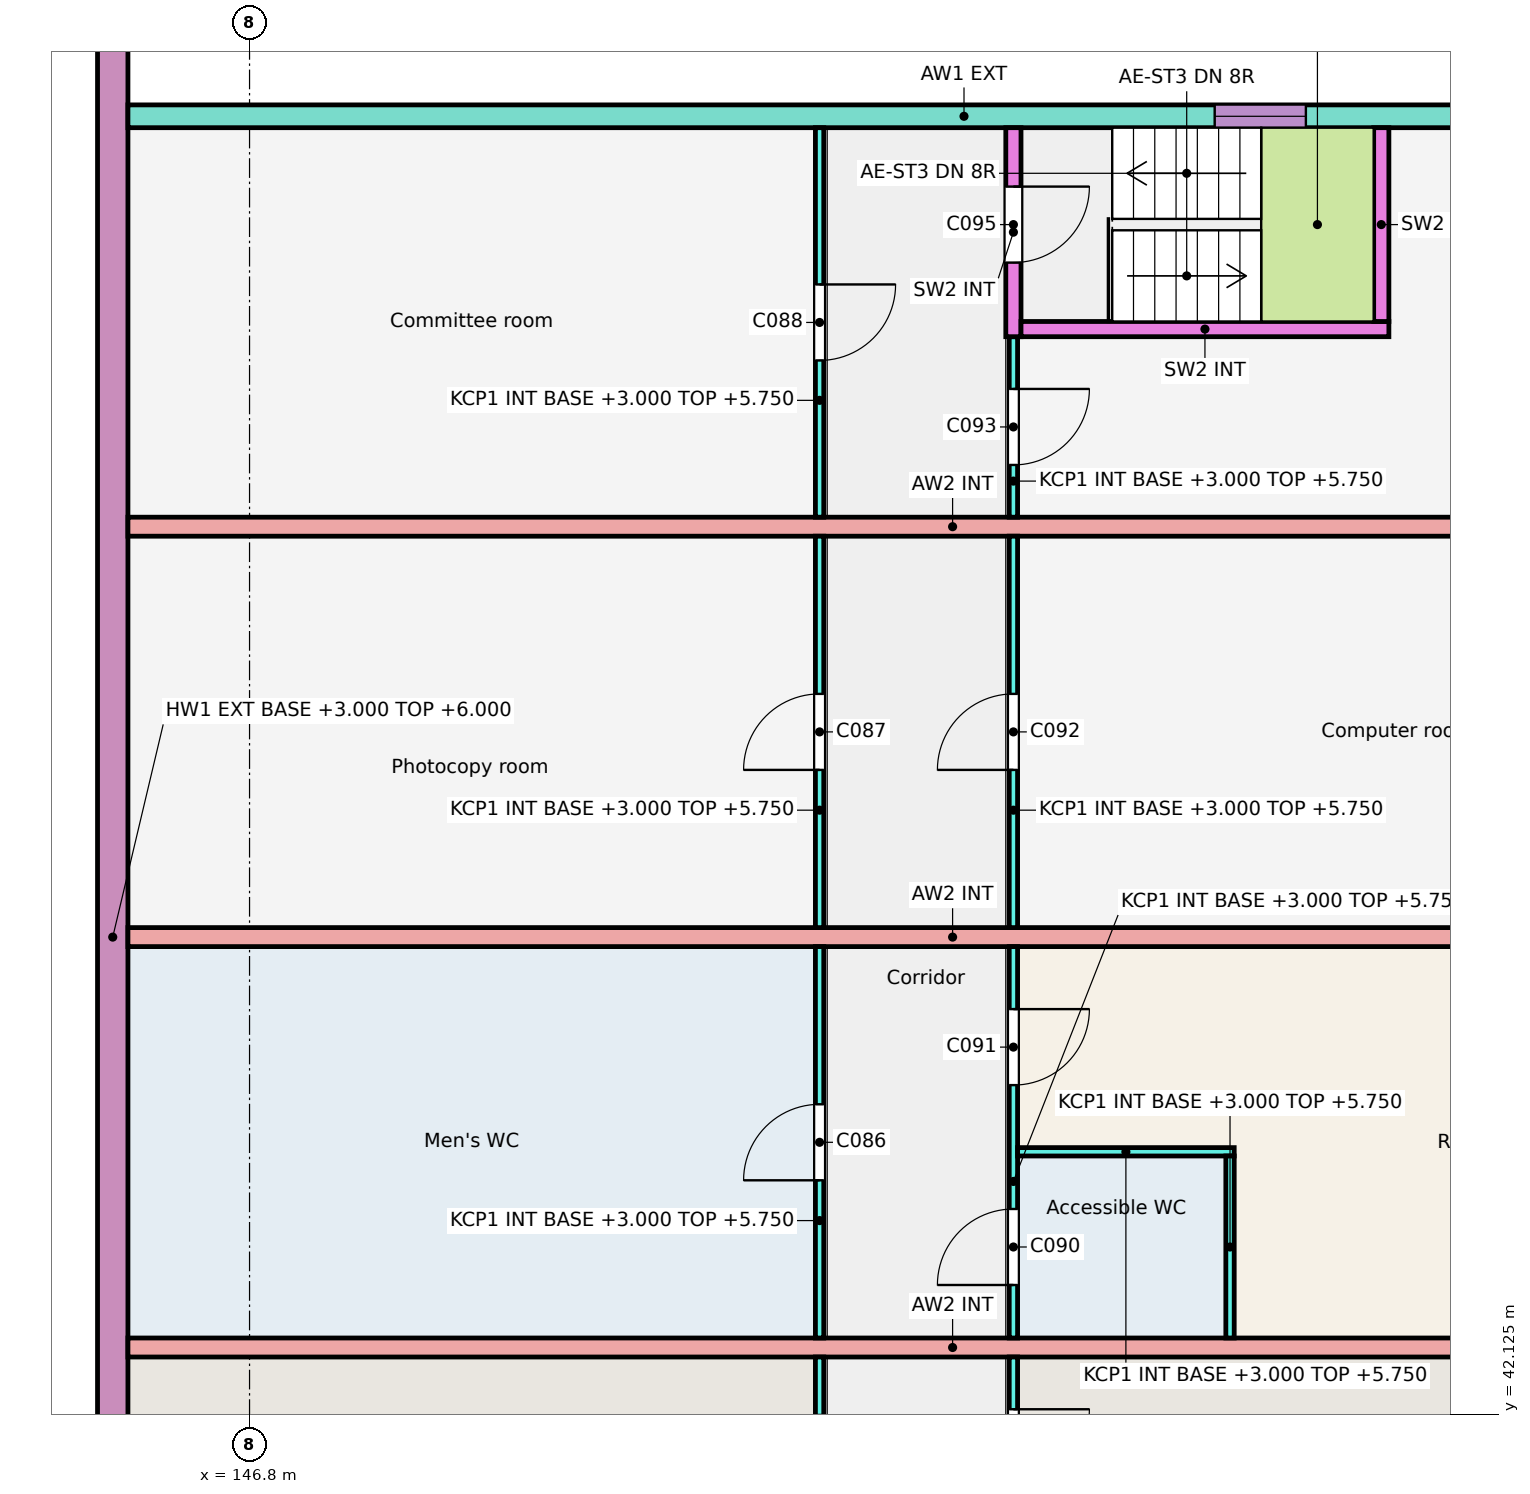
"""IFC4 building model, lengths in metres.
Left out: names, types, materials, properties, quantities, classifications, styles, units other than length and angle.
Written with IfcOpenShell. Run it as: python <this file> out.ifc"""

import sys

from ifc_helpers import new_model, si_unit, direction, frame, frame_2d, origin, place, context, subcontext, project, spatial, rectangle, extrude, element, fill, save


model = new_model("IFC4")
c1 = context("Model", 3, precision=1e-05, world=origin(), true_north=direction((0.0, 1.0)))
c2 = subcontext(c1, "Body", "Model", "MODEL_VIEW")
j1 = project(units=[si_unit("LENGTHUNIT", "METRE"), si_unit("PLANEANGLEUNIT", "RADIAN")], contexts=[c1])
p1 = place(None, origin())
s1 = spatial("IfcSite", under=j1, at=p1, CompositionType="ELEMENT")
p2 = place(p1, origin())
s2 = spatial("IfcBuilding", under=s1, at=p2, CompositionType="ELEMENT")
p3 = place(p2, frame((0.0, 0.0, 3.0)))
s3 = spatial("IfcBuildingStorey", under=s2, at=p3, CompositionType="ELEMENT", Elevation=3.0)
p4 = place(p3, frame((145.0, 32.0, 0.0), z_axis=(0.0, 0.0, 1.0), x_axis=(0.0, 1.0, 0.0)))
e1 = element("IfcWall", 1, at=p4, inside=s3, PredefinedType="SOLIDWALL", context=c2, shape_type="SweptSolid", body=[
    extrude(rectangle(XDim=32.8, YDim=0.4, at=frame_2d((16.4, 0.0))), origin(), (0.0, 0.0, 1.0), 3.0),
])
p5 = place(p4, frame((2.5, 0.0, 0.9)))
e2 = element("IfcOpeningElement", 2, at=p5, cuts=e1, PredefinedType="OPENING", context=c2, shape_type="SweptSolid", body=[
    extrude(rectangle(XDim=1.2, YDim=1.6, at=frame_2d((0.6, 0.8))), frame((0.0, 0.21, 0.0), z_axis=(0.0, -1.0, 0.0), x_axis=(1.0, 0.0, 0.0)), (0.0, 0.0, 1.0), 0.42),
])
p6 = place(p4, frame((29.3, 0.0, 0.9)))
e3 = element("IfcOpeningElement", 3, at=p6, cuts=e1, PredefinedType="OPENING", context=c2, shape_type="SweptSolid", body=[
    extrude(rectangle(XDim=1.2, YDim=1.6, at=frame_2d((0.6, 0.8))), frame((0.0, 0.21, 0.0), z_axis=(0.0, -1.0, 0.0), x_axis=(1.0, 0.0, 0.0)), (0.0, 0.0, 1.0), 0.42),
])
p7 = place(p3, frame((145.2, 59.2, 0.0), z_axis=(0.0, 0.0, 1.0), x_axis=(1.0, 0.0, 0.0)))
e4 = element("IfcWall", 4, at=p7, inside=s3, PredefinedType="SOLIDWALL", context=c2, shape_type="SweptSolid", body=[
    extrude(rectangle(XDim=22.0, YDim=0.3, at=frame_2d((11.0, 0.0))), origin(), (0.0, 0.0, 1.0), 3.0),
])
p8 = place(p7, frame((14.298, 0.0, 0.9)))
e5 = element("IfcOpeningElement", 5, at=p8, cuts=e4, PredefinedType="OPENING", context=c2, shape_type="SweptSolid", body=[
    extrude(rectangle(XDim=1.2, YDim=1.5, at=frame_2d((0.6, 0.75))), frame((0.0, 0.16, 0.0), z_axis=(0.0, -1.0, 0.0), x_axis=(1.0, 0.0, 0.0)), (0.0, 0.0, 1.0), 0.32),
])
for number, where, z_axis, x_axis in (
    (6, (145.2, 43.0, 0.0), (0.0, 0.0, 1.0), (1.0, 0.0, 0.0)),
    (7, (145.2, 48.4, 0.0), (0.0, 0.0, 1.0), (1.0, 0.0, 0.0)),
    (8, (145.2, 53.8, 0.0), (0.0, 0.0, 1.0), (1.0, 0.0, 0.0)),
):
    element("IfcWall", number, at=place(p3, frame(where, z_axis=z_axis, x_axis=x_axis)), inside=s3, PredefinedType="SOLIDWALL", context=c2, shape_type="SweptSolid", body=[
        extrude(rectangle(XDim=21.7, YDim=0.25, at=frame_2d((10.85, 0.0))), origin(), (0.0, 0.0, 1.0), 3.0),
    ])
p9 = place(p3, frame((154.3, 40.35, 0.0), z_axis=(0.0, 0.0, 1.0), x_axis=(0.0, 1.0, 0.0)))
e9 = element("IfcWall", 9, at=p9, inside=s3, PredefinedType="PARTITIONING", context=c2, shape_type="SweptSolid", body=[
    extrude(rectangle(XDim=2.525, YDim=0.11, at=frame_2d((1.262, 0.0))), origin(), (0.0, 0.0, 1.0), 2.75),
])
p10 = place(p9, frame((0.762, 0.0, 0.0)))
e10 = element("IfcOpeningElement", 10, at=p10, cuts=e9, PredefinedType="OPENING", context=c2, shape_type="SweptSolid", body=[
    extrude(rectangle(XDim=1.0, YDim=2.1, at=frame_2d((0.5, 1.05))), frame((0.0, 0.065, 0.0), z_axis=(0.0, -1.0, 0.0), x_axis=(1.0, 0.0, 0.0)), (0.0, 0.0, 1.0), 0.13),
])
p11 = place(p3, frame((154.3, 43.125, 0.0), z_axis=(0.0, 0.0, 1.0), x_axis=(0.0, 1.0, 0.0)))
e11 = element("IfcWall", 11, at=p11, inside=s3, PredefinedType="PARTITIONING", context=c2, shape_type="SweptSolid", body=[
    extrude(rectangle(XDim=5.15, YDim=0.11, at=frame_2d((2.575, 0.0))), origin(), (0.0, 0.0, 1.0), 2.75),
])
p12 = place(p11, frame((2.075, 0.0, 0.0)))
e12 = element("IfcOpeningElement", 12, at=p12, cuts=e11, PredefinedType="OPENING", context=c2, shape_type="SweptSolid", body=[
    extrude(rectangle(XDim=1.0, YDim=2.1, at=frame_2d((0.5, 1.05))), frame((0.0, 0.065, 0.0), z_axis=(0.0, -1.0, 0.0), x_axis=(1.0, 0.0, 0.0)), (0.0, 0.0, 1.0), 0.13),
])
p13 = place(p3, frame((154.3, 48.525, 0.0), z_axis=(0.0, 0.0, 1.0), x_axis=(0.0, 1.0, 0.0)))
e13 = element("IfcWall", 13, at=p13, inside=s3, PredefinedType="PARTITIONING", context=c2, shape_type="SweptSolid", body=[
    extrude(rectangle(XDim=5.15, YDim=0.11, at=frame_2d((2.575, 0.0))), origin(), (0.0, 0.0, 1.0), 2.75),
])
p14 = place(p13, frame((2.075, 0.0, 0.0)))
e14 = element("IfcOpeningElement", 14, at=p14, cuts=e13, PredefinedType="OPENING", context=c2, shape_type="SweptSolid", body=[
    extrude(rectangle(XDim=1.0, YDim=2.1, at=frame_2d((0.5, 1.05))), frame((0.0, 0.065, 0.0), z_axis=(0.0, -1.0, 0.0), x_axis=(1.0, 0.0, 0.0)), (0.0, 0.0, 1.0), 0.13),
])
p15 = place(p3, frame((154.3, 53.925, 0.0), z_axis=(0.0, 0.0, 1.0), x_axis=(0.0, 1.0, 0.0)))
e15 = element("IfcWall", 15, at=p15, inside=s3, PredefinedType="PARTITIONING", context=c2, shape_type="SweptSolid", body=[
    extrude(rectangle(XDim=5.125, YDim=0.11, at=frame_2d((2.562, 0.0))), origin(), (0.0, 0.0, 1.0), 2.75),
])
p16 = place(p15, frame((2.062, 0.0, 0.0)))
e16 = element("IfcOpeningElement", 16, at=p16, cuts=e15, PredefinedType="OPENING", context=c2, shape_type="SweptSolid", body=[
    extrude(rectangle(XDim=1.0, YDim=2.1, at=frame_2d((0.5, 1.05))), frame((0.0, 0.065, 0.0), z_axis=(0.0, -1.0, 0.0), x_axis=(1.0, 0.0, 0.0)), (0.0, 0.0, 1.0), 0.13),
])
p17 = place(p3, frame((156.85, 40.5, 0.0), z_axis=(0.0, 0.0, 1.0), x_axis=(0.0, 1.0, 0.0)))
e17 = element("IfcWall", 17, at=p17, inside=s3, PredefinedType="PARTITIONING", context=c2, shape_type="SweptSolid", body=[
    extrude(rectangle(XDim=2.375, YDim=0.11, at=frame_2d((1.188, 0.0))), origin(), (0.0, 0.0, 1.0), 2.75),
])
p18 = place(p17, frame((0.688, 0.0, 0.0)))
e18 = element("IfcOpeningElement", 18, at=p18, cuts=e17, PredefinedType="OPENING", context=c2, shape_type="SweptSolid", body=[
    extrude(rectangle(XDim=1.0, YDim=2.1, at=frame_2d((0.5, 1.05))), frame((0.0, 0.065, 0.0), z_axis=(0.0, -1.0, 0.0), x_axis=(1.0, 0.0, 0.0)), (0.0, 0.0, 1.0), 0.13),
])
p19 = place(p3, frame((156.85, 43.125, 0.0), z_axis=(0.0, 0.0, 1.0), x_axis=(0.0, 1.0, 0.0)))
e19 = element("IfcWall", 19, at=p19, inside=s3, PredefinedType="PARTITIONING", context=c2, shape_type="SweptSolid", body=[
    extrude(rectangle(XDim=5.15, YDim=0.11, at=frame_2d((2.575, 0.0))), origin(), (0.0, 0.0, 1.0), 2.75),
])
p20 = place(p19, frame((0.698, 0.0, 0.0)))
e20 = element("IfcOpeningElement", 20, at=p20, cuts=e19, PredefinedType="OPENING", context=c2, shape_type="SweptSolid", body=[
    extrude(rectangle(XDim=1.0, YDim=2.1, at=frame_2d((0.5, 1.05))), frame((0.0, 0.065, 0.0), z_axis=(0.0, -1.0, 0.0), x_axis=(1.0, 0.0, 0.0)), (0.0, 0.0, 1.0), 0.13),
])
p21 = place(p19, frame((3.327, 0.0, 0.0)))
e21 = element("IfcOpeningElement", 21, at=p21, cuts=e19, PredefinedType="OPENING", context=c2, shape_type="SweptSolid", body=[
    extrude(rectangle(XDim=1.0, YDim=2.1, at=frame_2d((0.5, 1.05))), frame((0.0, 0.065, 0.0), z_axis=(0.0, -1.0, 0.0), x_axis=(1.0, 0.0, 0.0)), (0.0, 0.0, 1.0), 0.13),
])
p22 = place(p3, frame((156.85, 48.525, 0.0), z_axis=(0.0, 0.0, 1.0), x_axis=(0.0, 1.0, 0.0)))
e22 = element("IfcWall", 22, at=p22, inside=s3, PredefinedType="PARTITIONING", context=c2, shape_type="SweptSolid", body=[
    extrude(rectangle(XDim=5.15, YDim=0.11, at=frame_2d((2.575, 0.0))), origin(), (0.0, 0.0, 1.0), 2.75),
])
p23 = place(p22, frame((2.075, 0.0, 0.0)))
e23 = element("IfcOpeningElement", 23, at=p23, cuts=e22, PredefinedType="OPENING", context=c2, shape_type="SweptSolid", body=[
    extrude(rectangle(XDim=1.0, YDim=2.1, at=frame_2d((0.5, 1.05))), frame((0.0, 0.065, 0.0), z_axis=(0.0, -1.0, 0.0), x_axis=(1.0, 0.0, 0.0)), (0.0, 0.0, 1.0), 0.13),
])
p24 = place(p3, frame((156.85, 53.925, 0.0), z_axis=(0.0, 0.0, 1.0), x_axis=(0.0, 1.0, 0.0)))
e24 = element("IfcWall", 24, at=p24, inside=s3, PredefinedType="PARTITIONING", context=c2, shape_type="SweptSolid", body=[
    extrude(rectangle(XDim=2.375, YDim=0.11, at=frame_2d((1.188, 0.0))), origin(), (0.0, 0.0, 1.0), 2.75),
])
p25 = place(p24, frame((0.688, 0.0, 0.0)))
e25 = element("IfcOpeningElement", 25, at=p25, cuts=e24, PredefinedType="OPENING", context=c2, shape_type="SweptSolid", body=[
    extrude(rectangle(XDim=1.0, YDim=2.1, at=frame_2d((0.5, 1.05))), frame((0.0, 0.065, 0.0), z_axis=(0.0, -1.0, 0.0), x_axis=(1.0, 0.0, 0.0)), (0.0, 0.0, 1.0), 0.13),
])
p26 = place(p3, frame((156.85, 56.3, 0.0), z_axis=(0.0, 0.0, 1.0), x_axis=(0.0, 1.0, 0.0)))
e26 = element("IfcWall", 26, at=p26, inside=s3, PredefinedType="SOLIDWALL", context=c2, shape_type="SweptSolid", body=[
    extrude(rectangle(XDim=2.75, YDim=0.2, at=frame_2d((1.375, 0.0))), origin(), (0.0, 0.0, 1.0), 2.75),
])
p27 = place(p26, frame((0.975, 0.0, 0.0)))
e27 = element("IfcOpeningElement", 27, at=p27, cuts=e26, PredefinedType="OPENING", context=c2, shape_type="SweptSolid", body=[
    extrude(rectangle(XDim=1.0, YDim=2.1, at=frame_2d((0.5, 1.05))), frame((0.0, 0.11, 0.0), z_axis=(0.0, -1.0, 0.0), x_axis=(1.0, 0.0, 0.0)), (0.0, 0.0, 1.0), 0.22),
])
p28 = place(p3, frame((156.95, 56.4, 0.0), z_axis=(0.0, 0.0, 1.0), x_axis=(1.0, 0.0, 0.0)))
e28 = element("IfcWall", 28, at=p28, inside=s3, PredefinedType="SOLIDWALL", context=c2, shape_type="SweptSolid", body=[
    extrude(rectangle(XDim=4.84, YDim=0.2, at=frame_2d((2.42, 0.0))), origin(), (0.0, 0.0, 1.0), 2.75),
])
p29 = place(p3, frame((161.69, 59.05, 0.0), z_axis=(0.0, 0.0, 1.0), x_axis=(0.0, -1.0, 0.0)))
e29 = element("IfcWall", 29, at=p29, inside=s3, PredefinedType="SOLIDWALL", context=c2, shape_type="SweptSolid", body=[
    extrude(rectangle(XDim=2.55, YDim=0.2, at=frame_2d((1.275, 0.0))), origin(), (0.0, 0.0, 1.0), 2.75),
])
p30 = place(p3, frame((156.905, 45.575, 0.0), z_axis=(0.0, 0.0, 1.0), x_axis=(1.0, 0.0, 0.0)))
e30 = element("IfcWall", 30, at=p30, inside=s3, PredefinedType="PARTITIONING", context=c2, shape_type="SweptSolid", body=[
    extrude(rectangle(XDim=2.85, YDim=0.11, at=frame_2d((1.425, 0.0))), origin(), (0.0, 0.0, 1.0), 2.75),
])
p31 = place(p3, frame((159.7, 43.125, 0.0), z_axis=(0.0, 0.0, 1.0), x_axis=(0.0, 1.0, 0.0)))
e31 = element("IfcWall", 31, at=p31, inside=s3, PredefinedType="PARTITIONING", context=c2, shape_type="SweptSolid", body=[
    extrude(rectangle(XDim=2.395, YDim=0.11, at=frame_2d((1.198, 0.0))), origin(), (0.0, 0.0, 1.0), 2.75),
])
p32 = place(p8, origin())
e32 = element("IfcWindow", 32, at=p32, inside=s3, PartitioningType="SINGLE_PANEL", PredefinedType="WINDOW", context=c2, shape_type="SweptSolid", body=[
    extrude(rectangle(XDim=1.2, YDim=1.5, at=frame_2d((0.6, 0.75))), frame((0.0, 0.03, 0.0), z_axis=(0.0, -1.0, 0.0), x_axis=(1.0, 0.0, 0.0)), (0.0, 0.0, 1.0), 0.06),
])
fill(e5, e32)
p33 = place(p12, origin())
e33 = element("IfcDoor", 33, at=p33, inside=s3, OperationType="SINGLE_SWING_LEFT", PredefinedType="DOOR", context=c2, shape_type="SweptSolid", body=[
    extrude(rectangle(XDim=1.0, YDim=2.1, at=frame_2d((0.5, 1.05))), frame((0.0, 0.025, 0.0), z_axis=(0.0, -1.0, 0.0), x_axis=(1.0, 0.0, 0.0)), (0.0, 0.0, 1.0), 0.05),
])
fill(e12, e33)
p34 = place(p14, origin())
e34 = element("IfcDoor", 34, at=p34, inside=s3, OperationType="SINGLE_SWING_LEFT", PredefinedType="DOOR", context=c2, shape_type="SweptSolid", body=[
    extrude(rectangle(XDim=1.0, YDim=2.1, at=frame_2d((0.5, 1.05))), frame((0.0, 0.025, 0.0), z_axis=(0.0, -1.0, 0.0), x_axis=(1.0, 0.0, 0.0)), (0.0, 0.0, 1.0), 0.05),
])
fill(e14, e34)
p35 = place(p16, origin())
e35 = element("IfcDoor", 35, at=p35, inside=s3, OperationType="SINGLE_SWING_RIGHT", PredefinedType="DOOR", context=c2, shape_type="SweptSolid", body=[
    extrude(rectangle(XDim=1.0, YDim=2.1, at=frame_2d((0.5, 1.05))), frame((0.0, 0.025, 0.0), z_axis=(0.0, -1.0, 0.0), x_axis=(1.0, 0.0, 0.0)), (0.0, 0.0, 1.0), 0.05),
])
fill(e16, e35)
p36 = place(p18, origin())
e36 = element("IfcDoor", 36, at=p36, inside=s3, OperationType="SINGLE_SWING_RIGHT", PredefinedType="DOOR", context=c2, shape_type="SweptSolid", body=[
    extrude(rectangle(XDim=1.0, YDim=2.1, at=frame_2d((0.5, 1.05))), frame((0.0, 0.025, 0.0), z_axis=(0.0, -1.0, 0.0), x_axis=(1.0, 0.0, 0.0)), (0.0, 0.0, 1.0), 0.05),
])
fill(e18, e36)
p37 = place(p20, origin())
e37 = element("IfcDoor", 37, at=p37, inside=s3, OperationType="SINGLE_SWING_LEFT", PredefinedType="DOOR", context=c2, shape_type="SweptSolid", body=[
    extrude(rectangle(XDim=1.0, YDim=2.1, at=frame_2d((0.5, 1.05))), frame((0.0, 0.025, 0.0), z_axis=(0.0, -1.0, 0.0), x_axis=(1.0, 0.0, 0.0)), (0.0, 0.0, 1.0), 0.05),
])
fill(e20, e37)
p38 = place(p21, origin())
e38 = element("IfcDoor", 38, at=p38, inside=s3, OperationType="SINGLE_SWING_RIGHT", PredefinedType="DOOR", context=c2, shape_type="SweptSolid", body=[
    extrude(rectangle(XDim=1.0, YDim=2.1, at=frame_2d((0.5, 1.05))), frame((0.0, 0.025, 0.0), z_axis=(0.0, -1.0, 0.0), x_axis=(1.0, 0.0, 0.0)), (0.0, 0.0, 1.0), 0.05),
])
fill(e21, e38)
p39 = place(p23, origin())
e39 = element("IfcDoor", 39, at=p39, inside=s3, OperationType="SINGLE_SWING_LEFT", PredefinedType="DOOR", context=c2, shape_type="SweptSolid", body=[
    extrude(rectangle(XDim=1.0, YDim=2.1, at=frame_2d((0.5, 1.05))), frame((0.0, 0.025, 0.0), z_axis=(0.0, -1.0, 0.0), x_axis=(1.0, 0.0, 0.0)), (0.0, 0.0, 1.0), 0.05),
])
fill(e23, e39)
p40 = place(p25, origin())
e40 = element("IfcDoor", 40, at=p40, inside=s3, OperationType="SINGLE_SWING_RIGHT", PredefinedType="DOOR", context=c2, shape_type="SweptSolid", body=[
    extrude(rectangle(XDim=1.0, YDim=2.1, at=frame_2d((0.5, 1.05))), frame((0.0, 0.025, 0.0), z_axis=(0.0, -1.0, 0.0), x_axis=(1.0, 0.0, 0.0)), (0.0, 0.0, 1.0), 0.05),
])
fill(e25, e40)
p41 = place(p27, origin())
e41 = element("IfcDoor", 41, at=p41, inside=s3, OperationType="SINGLE_SWING_RIGHT", PredefinedType="DOOR", context=c2, shape_type="SweptSolid", body=[
    extrude(rectangle(XDim=1.0, YDim=2.1, at=frame_2d((0.5, 1.05))), frame((0.0, 0.025, 0.0), z_axis=(0.0, -1.0, 0.0), x_axis=(1.0, 0.0, 0.0)), (0.0, 0.0, 1.0), 0.05),
])
fill(e27, e41)
save(model, sys.argv[1])
